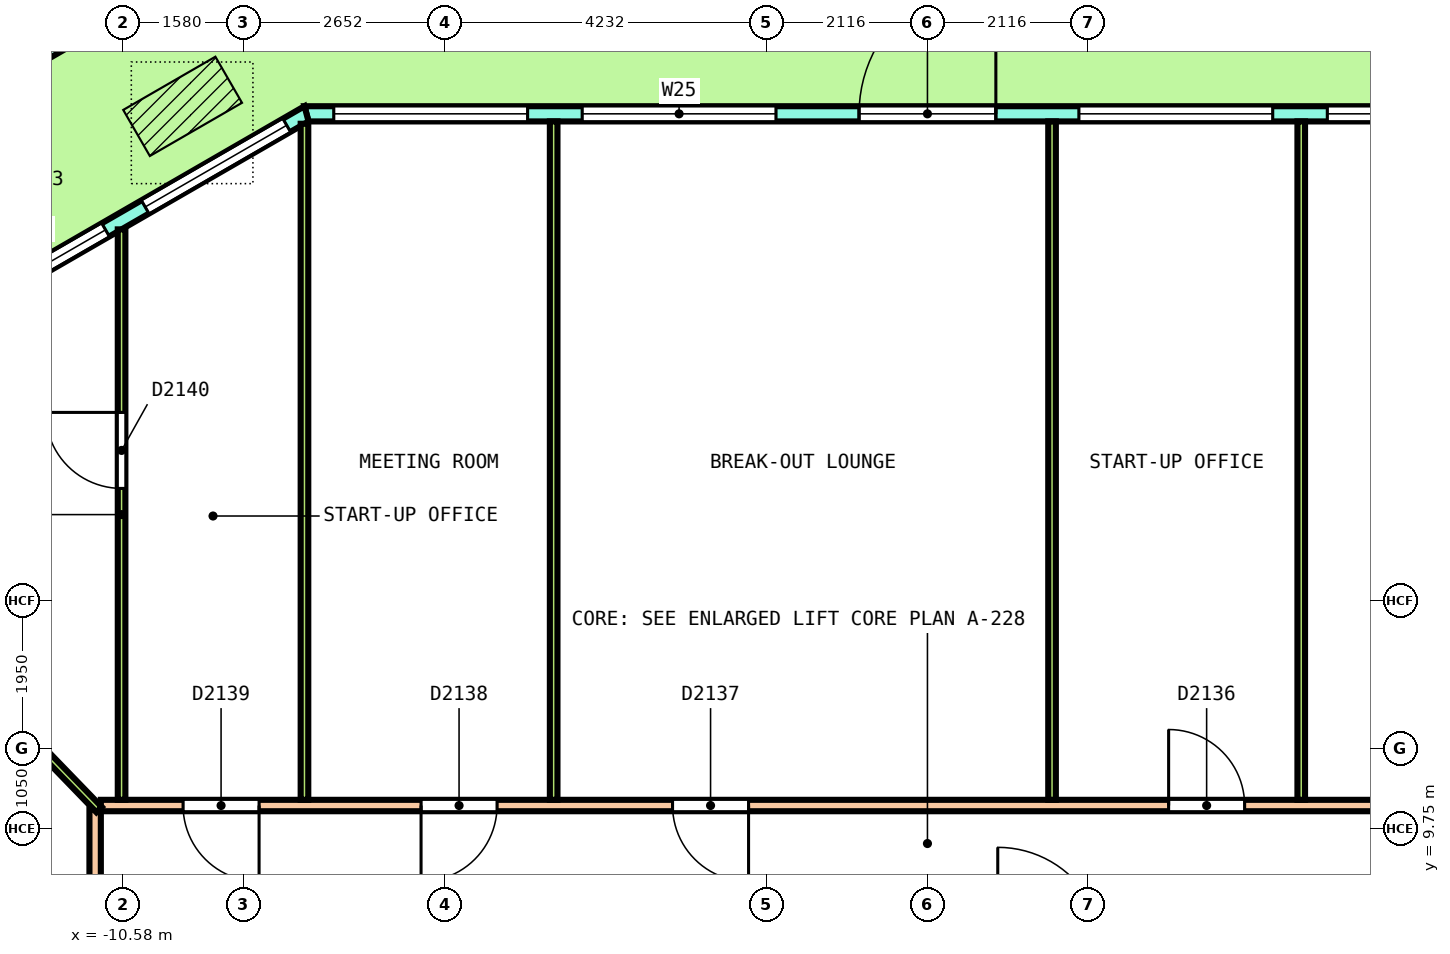
"""IFC4 building model, lengths in metres.
Left out: names, types, materials, properties, quantities, classifications, styles, units other than length and angle.
Written with IfcOpenShell. Run it as: python <this file> out.ifc"""

import sys

from ifc_helpers import new_model, si_unit, direction, frame, frame_2d, origin, origin_2d, place, context, subcontext, project, spatial, polyline, rectangle, outline, extrude, element, fill, save


model = new_model("IFC4")
c1 = context("Model", 3, precision=1e-05, world=origin(), true_north=direction((0.0, 1.0)))
c2 = subcontext(c1, "Body", "Model", "MODEL_VIEW")
j1 = project(units=[si_unit("LENGTHUNIT", "METRE"), si_unit("PLANEANGLEUNIT", "RADIAN")], contexts=[c1])
p1 = place(None, origin())
s1 = spatial("IfcSite", under=j1, at=p1, CompositionType="ELEMENT")
p2 = place(p1, origin())
s2 = spatial("IfcBuilding", under=s1, at=p2, CompositionType="ELEMENT")
p3 = place(p2, frame((0.0, 0.0, 271.0)))
s3 = spatial("IfcBuildingStorey", under=s2, at=p3, CompositionType="ELEMENT", Elevation=271.0)
p4 = place(p3, frame((-11.952, 20.199, 0.0), z_axis=(-0.036297136169, 0.0, 0.99934104184), x_axis=(-0.865312543657, -0.500246354177, -0.031429077673)))
e1 = element("IfcColumn", 1, at=p4, inside=s3, PredefinedType="COLUMN", context=c2, shape_type="SweptSolid", body=[
    extrude(rectangle(XDim=0.95, YDim=0.95, at=origin_2d()), origin(), (0.0, 0.0, 1.0), 3.652),
])
p5 = place(p3, frame((8.169, 19.15, 0.0), z_axis=(0.0, 0.0, 1.0), x_axis=(-1.0, 0.0, 0.0)))
e2 = element("IfcWall", 2, at=p5, inside=s3, PredefinedType="SOLIDWALL", context=c2, shape_type="SweptSolid", body=[
    extrude(outline(polyline([(-0.027, -0.1), (0.998, -0.1), (2.022, -0.1), (3.047, -0.1), (4.071, -0.1), (5.096, -0.1), (6.12, -0.1), (7.145, -0.1), (8.169, -0.1), (9.194, -0.1), (10.218, -0.1), (11.243, -0.1), (12.267, -0.1), (13.292, -0.1), (14.316, -0.1), (15.341, -0.1), (16.365, -0.1), (16.312, 0.1), (15.294, 0.1), (14.276, 0.1), (13.258, 0.1), (12.24, 0.1), (11.223, 0.1), (10.205, 0.1), (9.187, 0.1), (8.169, 0.1), (7.151, 0.1), (6.134, 0.1), (5.116, 0.1), (4.098, 0.1), (3.08, 0.1), (2.062, 0.1), (1.045, 0.1), (0.027, 0.1), (-0.027, -0.1)])), origin(), (0.0, 0.0, 1.0), 3.7),
])
p6 = place(p5, frame((0.359, 0.0, 0.1)))
e3 = element("IfcOpeningElement", 3, at=p6, cuts=e2, PredefinedType="OPENING", context=c2, shape_type="SweptSolid", body=[
    extrude(rectangle(XDim=2.55, YDim=2.75, at=frame_2d((1.275, 1.375))), frame((0.0, 0.11, 0.0), z_axis=(0.0, -1.0, 0.0), x_axis=(1.0, 0.0, 0.0)), (0.0, 0.0, 1.0), 0.22),
])
p7 = place(p5, frame((3.626, 0.0, 0.1)))
e4 = element("IfcOpeningElement", 4, at=p7, cuts=e2, PredefinedType="OPENING", context=c2, shape_type="SweptSolid", body=[
    extrude(rectangle(XDim=2.55, YDim=2.75, at=frame_2d((1.275, 1.375))), frame((0.0, 0.11, 0.0), z_axis=(0.0, -1.0, 0.0), x_axis=(1.0, 0.0, 0.0)), (0.0, 0.0, 1.0), 0.22),
])
p8 = place(p5, frame((7.269, 0.0, 0.0)))
e5 = element("IfcOpeningElement", 5, at=p8, cuts=e2, PredefinedType="OPENING", context=c2, shape_type="SweptSolid", body=[
    extrude(rectangle(XDim=1.8, YDim=2.4, at=frame_2d((0.9, 1.2))), frame((0.0, 0.11, 0.0), z_axis=(0.0, -1.0, 0.0), x_axis=(1.0, 0.0, 0.0)), (0.0, 0.0, 1.0), 0.22),
])
p9 = place(p5, frame((7.269, 0.0, 2.55)))
e6 = element("IfcOpeningElement", 6, at=p9, cuts=e2, PredefinedType="OPENING", context=c2, shape_type="SweptSolid", body=[
    extrude(rectangle(XDim=1.8, YDim=0.3, at=frame_2d((0.9, 0.15))), frame((0.0, 0.11, 0.0), z_axis=(0.0, -1.0, 0.0), x_axis=(1.0, 0.0, 0.0)), (0.0, 0.0, 1.0), 0.22),
])
p10 = place(p5, frame((10.162, 0.0, 0.1)))
e7 = element("IfcOpeningElement", 7, at=p10, cuts=e2, PredefinedType="OPENING", context=c2, shape_type="SweptSolid", body=[
    extrude(rectangle(XDim=2.55, YDim=2.75, at=frame_2d((1.275, 1.375))), frame((0.0, 0.11, 0.0), z_axis=(0.0, -1.0, 0.0), x_axis=(1.0, 0.0, 0.0)), (0.0, 0.0, 1.0), 0.22),
])
p11 = place(p5, frame((13.429, 0.0, 0.1)))
e8 = element("IfcOpeningElement", 8, at=p11, cuts=e2, PredefinedType="OPENING", context=c2, shape_type="SweptSolid", body=[
    extrude(rectangle(XDim=2.55, YDim=2.75, at=frame_2d((1.275, 1.375))), frame((0.0, 0.11, 0.0), z_axis=(0.0, -1.0, 0.0), x_axis=(1.0, 0.0, 0.0)), (0.0, 0.0, 1.0), 0.22),
])
p12 = place(p3, frame((-8.169, 19.15, 0.0), z_axis=(0.0, 0.0, 1.0), x_axis=(-0.866026017613, -0.499998936816, 0.0)))
e9 = element("IfcWall", 9, at=p12, inside=s3, PredefinedType="SOLIDWALL", context=c2, shape_type="SweptSolid", body=[
    extrude(outline(polyline([(-0.027, -0.1), (1.084, -0.1), (2.196, -0.1), (3.307, -0.1), (4.419, -0.1), (5.53, -0.1), (5.477, 0.1), (4.387, 0.1), (3.297, 0.1), (2.207, 0.1), (1.117, 0.1), (0.027, 0.1), (-0.027, -0.1)])), origin(), (0.0, 0.0, 1.0), 3.7),
])
p13 = place(p12, frame((0.301, 0.0, 0.1)))
e10 = element("IfcOpeningElement", 10, at=p13, cuts=e9, PredefinedType="OPENING", context=c2, shape_type="SweptSolid", body=[
    extrude(rectangle(XDim=2.15, YDim=2.75, at=frame_2d((1.075, 1.375))), frame((0.0, 0.11, 0.0), z_axis=(0.0, -1.0, 0.0), x_axis=(1.0, 0.0, 0.0)), (0.0, 0.0, 1.0), 0.22),
])
p14 = place(p12, frame((3.052, 0.0, 0.1)))
e11 = element("IfcOpeningElement", 11, at=p14, cuts=e9, PredefinedType="OPENING", context=c2, shape_type="SweptSolid", body=[
    extrude(rectangle(XDim=2.15, YDim=2.75, at=frame_2d((1.075, 1.375))), frame((0.0, 0.11, 0.0), z_axis=(0.0, -1.0, 0.0), x_axis=(1.0, 0.0, 0.0)), (0.0, 0.0, 1.0), 0.22),
])
p15 = place(p3, frame((-10.875, 10.05, 0.0), z_axis=(0.0, 0.0, 1.0), x_axis=(1.0, 0.0, 0.0)))
e12 = element("IfcWall", 12, at=p15, inside=s3, PredefinedType="PARTITIONING", context=c2, shape_type="SweptSolid", body=[
    extrude(rectangle(XDim=21.775, YDim=0.15, at=frame_2d((10.887, 0.0))), origin(), (0.0, 0.0, 1.0), 2.9),
])
p16 = place(p15, frame((17.089, 0.0, 0.0)))
e13 = element("IfcOpeningElement", 13, at=p16, cuts=e12, PredefinedType="OPENING", context=c2, shape_type="SweptSolid", body=[
    extrude(rectangle(XDim=1.2, YDim=2.1, at=frame_2d((0.6, 1.05))), frame((0.0, 0.085, 0.0), z_axis=(0.0, -1.0, 0.0), x_axis=(1.0, 0.0, 0.0)), (0.0, 0.0, 1.0), 0.17),
])
p17 = place(p15, frame((14.048, 0.0, 0.0)))
e14 = element("IfcOpeningElement", 14, at=p17, cuts=e12, PredefinedType="OPENING", context=c2, shape_type="SweptSolid", body=[
    extrude(rectangle(XDim=1.0, YDim=2.1, at=frame_2d((0.5, 1.05))), frame((0.0, 0.085, 0.0), z_axis=(0.0, -1.0, 0.0), x_axis=(1.0, 0.0, 0.0)), (0.0, 0.0, 1.0), 0.17),
])
p18 = place(p15, frame((7.521, 0.0, 0.0)))
e15 = element("IfcOpeningElement", 15, at=p18, cuts=e12, PredefinedType="OPENING", context=c2, shape_type="SweptSolid", body=[
    extrude(rectangle(XDim=1.0, YDim=2.1, at=frame_2d((0.5, 1.05))), frame((0.0, 0.085, 0.0), z_axis=(0.0, -1.0, 0.0), x_axis=(1.0, 0.0, 0.0)), (0.0, 0.0, 1.0), 0.17),
])
p19 = place(p15, frame((4.213, 0.0, 0.0)))
e16 = element("IfcOpeningElement", 16, at=p19, cuts=e12, PredefinedType="OPENING", context=c2, shape_type="SweptSolid", body=[
    extrude(rectangle(XDim=1.0, YDim=2.1, at=frame_2d((0.5, 1.05))), frame((0.0, 0.085, 0.0), z_axis=(0.0, -1.0, 0.0), x_axis=(1.0, 0.0, 0.0)), (0.0, 0.0, 1.0), 0.17),
])
p20 = place(p15, frame((1.082, 0.0, 0.0)))
e17 = element("IfcOpeningElement", 17, at=p20, cuts=e12, PredefinedType="OPENING", context=c2, shape_type="SweptSolid", body=[
    extrude(rectangle(XDim=1.0, YDim=2.1, at=frame_2d((0.5, 1.05))), frame((0.0, 0.085, 0.0), z_axis=(0.0, -1.0, 0.0), x_axis=(1.0, 0.0, 0.0)), (0.0, 0.0, 1.0), 0.17),
])
p21 = place(p3, frame((-10.95, -7.025, 0.0), z_axis=(0.0, 0.0, 1.0), x_axis=(0.0, 1.0, 0.0)))
e18 = element("IfcWall", 18, at=p21, inside=s3, PredefinedType="PARTITIONING", context=c2, shape_type="SweptSolid", body=[
    extrude(rectangle(XDim=17.025, YDim=0.15, at=frame_2d((8.512, 0.0))), origin(), (0.0, 0.0, 1.0), 2.9),
])
p22 = place(p21, frame((13.439, 0.0, 0.0)))
e19 = element("IfcOpeningElement", 19, at=p22, cuts=e18, PredefinedType="OPENING", context=c2, shape_type="SweptSolid", body=[
    extrude(rectangle(XDim=1.0, YDim=2.1, at=frame_2d((0.5, 1.05))), frame((0.0, 0.085, 0.0), z_axis=(0.0, -1.0, 0.0), x_axis=(1.0, 0.0, 0.0)), (0.0, 0.0, 1.0), 0.17),
])
p23 = place(p21, frame((8.972, 0.0, 0.0)))
e20 = element("IfcOpeningElement", 20, at=p23, cuts=e18, PredefinedType="OPENING", context=c2, shape_type="SweptSolid", body=[
    extrude(rectangle(XDim=1.2, YDim=2.1, at=frame_2d((0.6, 1.05))), frame((0.0, 0.085, 0.0), z_axis=(0.0, -1.0, 0.0), x_axis=(1.0, 0.0, 0.0)), (0.0, 0.0, 1.0), 0.17),
])
for number, where, z_axis, x_axis in (
    (21, (4.917, 10.125, 0.0), (0.0, 0.0, 1.0), (0.0, 1.0, 0.0)),
    (22, (1.639, 10.125, 0.0), (0.0, 0.0, 1.0), (0.0, 1.0, 0.0)),
    (23, (-4.917, 10.125, 0.0), (0.0, 0.0, 1.0), (0.0, 1.0, 0.0)),
):
    element("IfcWall", number, at=place(p3, frame(where, z_axis=z_axis, x_axis=x_axis)), inside=s3, PredefinedType="PARTITIONING", context=c2, shape_type="SweptSolid", body=[
        extrude(rectangle(XDim=8.925, YDim=0.1, at=frame_2d((4.462, 0.0))), origin(), (0.0, 0.0, 1.0), 2.9),
    ])
p24 = place(p3, frame((-8.196, 10.125, 0.0), z_axis=(0.0, 0.0, 1.0), x_axis=(0.0, 1.0, 0.0)))
e24 = element("IfcWall", 24, at=p24, inside=s3, PredefinedType="PARTITIONING", context=c2, shape_type="SweptSolid", body=[
    extrude(rectangle(XDim=8.894, YDim=0.1, at=frame_2d((4.447, 0.0))), origin(), (0.0, 0.0, 1.0), 2.9),
])
p25 = place(p3, frame((-10.602, 10.125, 0.0), z_axis=(0.0, 0.0, 1.0), x_axis=(0.0, 1.0, 0.0)))
e25 = element("IfcWall", 25, at=p25, inside=s3, PredefinedType="PARTITIONING", context=c2, shape_type="SweptSolid", body=[
    extrude(rectangle(XDim=7.505, YDim=0.1, at=frame_2d((3.752, 0.0))), origin(), (0.0, 0.0, 1.0), 2.9),
])
p26 = place(p25, frame((4.097, 0.0, 0.0)))
e26 = element("IfcOpeningElement", 26, at=p26, cuts=e25, PredefinedType="OPENING", context=c2, shape_type="SweptSolid", body=[
    extrude(rectangle(XDim=1.0, YDim=2.1, at=frame_2d((0.5, 1.05))), frame((0.0, 0.06, 0.0), z_axis=(0.0, -1.0, 0.0), x_axis=(1.0, 0.0, 0.0)), (0.0, 0.0, 1.0), 0.12),
])
p27 = place(p3, frame((-14.416, 13.634, 0.0), z_axis=(0.0, 0.0, 1.0), x_axis=(0.69518833949, -0.718827637641, 0.0)))
e27 = element("IfcWall", 27, at=p27, inside=s3, PredefinedType="PARTITIONING", context=c2, shape_type="SweptSolid", body=[
    extrude(rectangle(XDim=5.061, YDim=0.1, at=frame_2d((2.53, 0.0))), origin(), (0.0, 0.0, 1.0), 2.9),
])
p28 = place(p6, origin())
e28 = element("IfcWindow", 28, at=p28, inside=s3, PartitioningType="SINGLE_PANEL", PredefinedType="WINDOW", context=c2, shape_type="SweptSolid", body=[
    extrude(rectangle(XDim=2.55, YDim=2.75, at=frame_2d((1.275, 1.375))), frame((0.0, 0.03, 0.0), z_axis=(0.0, -1.0, 0.0), x_axis=(1.0, 0.0, 0.0)), (0.0, 0.0, 1.0), 0.06),
])
fill(e3, e28)
p29 = place(p7, origin())
e29 = element("IfcWindow", 29, at=p29, inside=s3, PartitioningType="SINGLE_PANEL", PredefinedType="WINDOW", context=c2, shape_type="SweptSolid", body=[
    extrude(rectangle(XDim=2.55, YDim=2.75, at=frame_2d((1.275, 1.375))), frame((0.0, 0.03, 0.0), z_axis=(0.0, -1.0, 0.0), x_axis=(1.0, 0.0, 0.0)), (0.0, 0.0, 1.0), 0.06),
])
fill(e4, e29)
p30 = place(p8, origin())
e30 = element("IfcDoor", 30, at=p30, inside=s3, OperationType="DOUBLE_DOOR_SINGLE_SWING", PredefinedType="DOOR", context=c2, shape_type="SweptSolid", body=[
    extrude(rectangle(XDim=1.8, YDim=2.4, at=frame_2d((0.9, 1.2))), frame((0.0, 0.025, 0.0), z_axis=(0.0, -1.0, 0.0), x_axis=(1.0, 0.0, 0.0)), (0.0, 0.0, 1.0), 0.05),
])
fill(e5, e30)
p31 = place(p9, origin())
e31 = element("IfcWindow", 31, at=p31, inside=s3, PartitioningType="SINGLE_PANEL", PredefinedType="WINDOW", context=c2, shape_type="SweptSolid", body=[
    extrude(rectangle(XDim=1.8, YDim=0.3, at=frame_2d((0.9, 0.15))), frame((0.0, 0.03, 0.0), z_axis=(0.0, -1.0, 0.0), x_axis=(1.0, 0.0, 0.0)), (0.0, 0.0, 1.0), 0.06),
])
fill(e6, e31)
p32 = place(p10, origin())
e32 = element("IfcWindow", 32, at=p32, inside=s3, PartitioningType="SINGLE_PANEL", PredefinedType="WINDOW", context=c2, shape_type="SweptSolid", body=[
    extrude(rectangle(XDim=2.55, YDim=2.75, at=frame_2d((1.275, 1.375))), frame((0.0, 0.03, 0.0), z_axis=(0.0, -1.0, 0.0), x_axis=(1.0, 0.0, 0.0)), (0.0, 0.0, 1.0), 0.06),
])
fill(e7, e32)
p33 = place(p11, origin())
e33 = element("IfcWindow", 33, at=p33, inside=s3, PartitioningType="SINGLE_PANEL", PredefinedType="WINDOW", context=c2, shape_type="SweptSolid", body=[
    extrude(rectangle(XDim=2.55, YDim=2.75, at=frame_2d((1.275, 1.375))), frame((0.0, 0.03, 0.0), z_axis=(0.0, -1.0, 0.0), x_axis=(1.0, 0.0, 0.0)), (0.0, 0.0, 1.0), 0.06),
])
fill(e8, e33)
p34 = place(p13, origin())
e34 = element("IfcWindow", 34, at=p34, inside=s3, PartitioningType="SINGLE_PANEL", PredefinedType="WINDOW", context=c2, shape_type="SweptSolid", body=[
    extrude(rectangle(XDim=2.15, YDim=2.75, at=frame_2d((1.075, 1.375))), frame((0.0, 0.03, 0.0), z_axis=(0.0, -1.0, 0.0), x_axis=(1.0, 0.0, 0.0)), (0.0, 0.0, 1.0), 0.06),
])
fill(e10, e34)
p35 = place(p14, origin())
e35 = element("IfcWindow", 35, at=p35, inside=s3, PartitioningType="SINGLE_PANEL", PredefinedType="WINDOW", context=c2, shape_type="SweptSolid", body=[
    extrude(rectangle(XDim=2.15, YDim=2.75, at=frame_2d((1.075, 1.375))), frame((0.0, 0.03, 0.0), z_axis=(0.0, -1.0, 0.0), x_axis=(1.0, 0.0, 0.0)), (0.0, 0.0, 1.0), 0.06),
])
fill(e11, e35)
p36 = place(p17, origin())
e36 = element("IfcDoor", 36, at=p36, inside=s3, OperationType="SINGLE_SWING_LEFT", PredefinedType="DOOR", context=c2, shape_type="SweptSolid", body=[
    extrude(rectangle(XDim=1.0, YDim=2.1, at=frame_2d((0.5, 1.05))), frame((0.0, 0.025, 0.0), z_axis=(0.0, -1.0, 0.0), x_axis=(1.0, 0.0, 0.0)), (0.0, 0.0, 1.0), 0.05),
])
fill(e14, e36)
p37 = place(p18, origin())
e37 = element("IfcDoor", 37, at=p37, inside=s3, OperationType="SINGLE_SWING_RIGHT", PredefinedType="DOOR", context=c2, shape_type="SweptSolid", body=[
    extrude(rectangle(XDim=1.0, YDim=2.1, at=frame_2d((0.5, 1.05))), frame((0.0, 0.025, 0.0), z_axis=(0.0, -1.0, 0.0), x_axis=(1.0, 0.0, 0.0)), (0.0, 0.0, 1.0), 0.05),
])
fill(e15, e37)
p38 = place(p19, origin())
e38 = element("IfcDoor", 38, at=p38, inside=s3, OperationType="SINGLE_SWING_RIGHT", PredefinedType="DOOR", context=c2, shape_type="SweptSolid", body=[
    extrude(rectangle(XDim=1.0, YDim=2.1, at=frame_2d((0.5, 1.05))), frame((0.0, 0.025, 0.0), z_axis=(0.0, -1.0, 0.0), x_axis=(1.0, 0.0, 0.0)), (0.0, 0.0, 1.0), 0.05),
])
fill(e16, e38)
p39 = place(p20, origin())
e39 = element("IfcDoor", 39, at=p39, inside=s3, OperationType="SINGLE_SWING_RIGHT", PredefinedType="DOOR", context=c2, shape_type="SweptSolid", body=[
    extrude(rectangle(XDim=1.0, YDim=2.1, at=frame_2d((0.5, 1.05))), frame((0.0, 0.025, 0.0), z_axis=(0.0, -1.0, 0.0), x_axis=(1.0, 0.0, 0.0)), (0.0, 0.0, 1.0), 0.05),
])
fill(e17, e39)
p40 = place(p26, origin())
e40 = element("IfcDoor", 40, at=p40, inside=s3, OperationType="SINGLE_SWING_LEFT", PredefinedType="DOOR", context=c2, shape_type="SweptSolid", body=[
    extrude(rectangle(XDim=1.0, YDim=2.1, at=frame_2d((0.5, 1.05))), frame((0.0, 0.025, 0.0), z_axis=(0.0, -1.0, 0.0), x_axis=(1.0, 0.0, 0.0)), (0.0, 0.0, 1.0), 0.05),
])
fill(e26, e40)
save(model, sys.argv[1])
